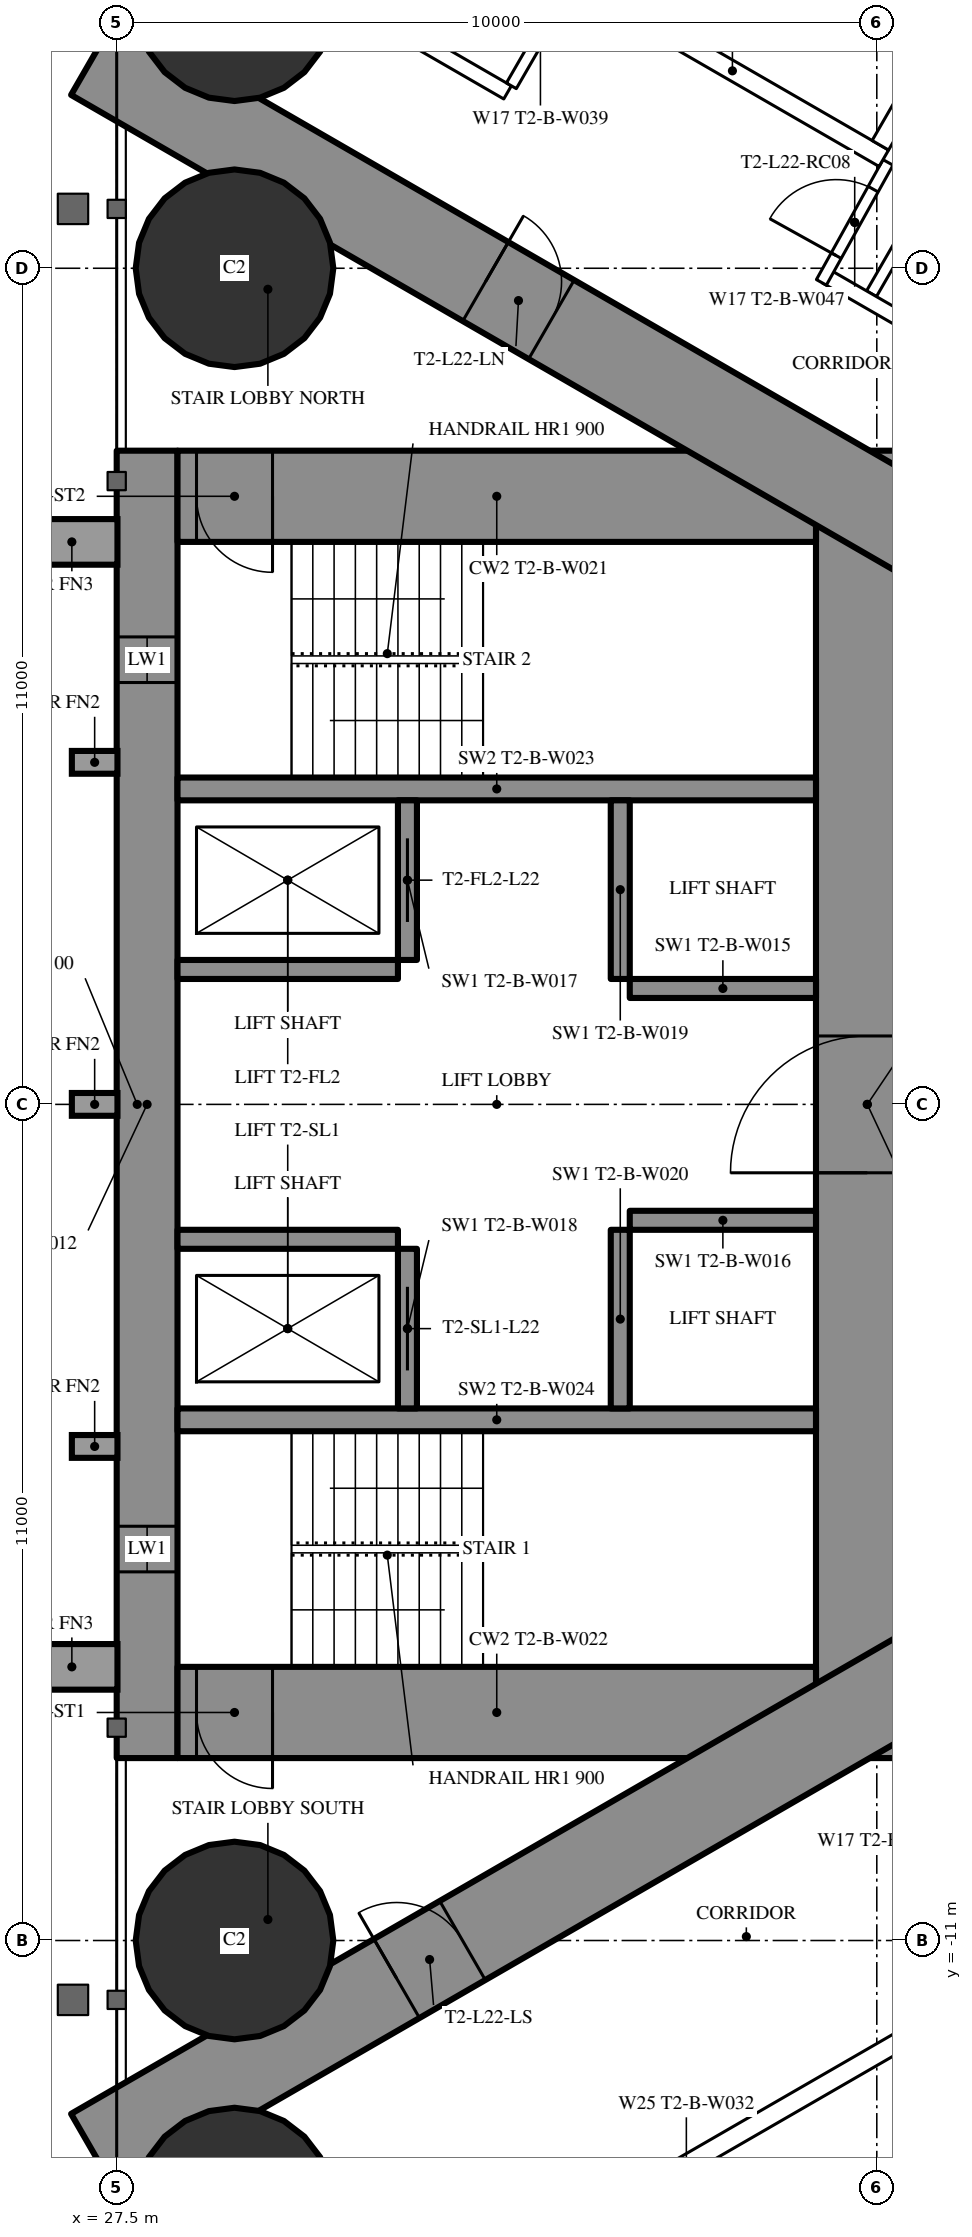
"""IFC4 building model, lengths in metres.
Left out: names, types, materials, properties, quantities, classifications, styles, units other than length and angle.
Written with IfcOpenShell. Run it as: python <this file> out.ifc"""

import sys

from ifc_helpers import new_model, si_unit, direction, frame, frame_2d, origin, origin_2d, place, context, subcontext, project, spatial, rectangle, hollow_circle, extrude, element, fill, save


model = new_model("IFC4")
c1 = context("Model", 3, precision=1e-05, world=origin(), true_north=direction((0.0, 1.0)))
c2 = subcontext(c1, "Body", "Model", "MODEL_VIEW")
j1 = project(units=[si_unit("LENGTHUNIT", "METRE"), si_unit("PLANEANGLEUNIT", "RADIAN")], contexts=[c1])
p1 = place(None, origin())
s1 = spatial("IfcSite", under=j1, at=p1, CompositionType="ELEMENT")
p2 = place(p1, origin())
s2 = spatial("IfcBuilding", under=s1, at=p2, CompositionType="ELEMENT")
p3 = place(p2, frame((0.0, 0.0, 87.0)))
s3 = spatial("IfcBuildingStorey", under=s2, at=p3, CompositionType="ELEMENT", Elevation=87.0)
for number, where, z_axis, x_axis in (
    (1, (29.05, 11.0, 0.0), (0.0, 0.0, 1.0), (1.0, 0.0, 0.0)),
    (2, (29.05, -11.0, 0.0), (0.0, 0.0, 1.0), (1.0, 0.0, 0.0)),
    (3, (29.05, -14.5, 0.0), (0.0, 0.0, 1.0), (1.0, 0.0, 0.0)),
    (4, (29.05, 14.5, 0.0), (0.0, 0.0, 1.0), (1.0, 0.0, 0.0)),
):
    element("IfcColumn", number, at=place(p3, frame(where, z_axis=z_axis, x_axis=x_axis)), inside=s3, PredefinedType="COLUMN", context=c2, shape_type="SweptSolid", body=[
        extrude(hollow_circle(Radius=1.3, WallThickness=0.1, at=origin_2d()), origin(), (0.0, 0.0, 1.0), 3.6),
    ])
p4 = place(p3, frame((27.9, -8.6, 0.0), z_axis=(0.0, 0.0, 1.0), x_axis=(0.0, 1.0, 0.0)))
e5 = element("IfcWall", 5, at=p4, inside=s3, PredefinedType="SHEAR", context=c2, shape_type="SweptSolid", body=[
    extrude(rectangle(XDim=17.2, YDim=0.8, at=frame_2d((8.6, 0.0))), origin(), (0.0, 0.0, 1.0), 3.6),
])
p5 = place(p4, frame((2.45, 0.0, 0.6)))
e6 = element("IfcOpeningElement", 6, at=p5, cuts=e5, PredefinedType="OPENING", context=c2, shape_type="SweptSolid", body=[
    extrude(rectangle(XDim=0.6, YDim=2.1, at=frame_2d((0.3, 1.05))), frame((0.0, 0.41, 0.0), z_axis=(0.0, -1.0, 0.0), x_axis=(1.0, 0.0, 0.0)), (0.0, 0.0, 1.0), 0.82),
])
p6 = place(p4, frame((14.15, 0.0, 0.6)))
e7 = element("IfcOpeningElement", 7, at=p6, cuts=e5, PredefinedType="OPENING", context=c2, shape_type="SweptSolid", body=[
    extrude(rectangle(XDim=0.6, YDim=2.1, at=frame_2d((0.3, 1.05))), frame((0.0, 0.41, 0.0), z_axis=(0.0, -1.0, 0.0), x_axis=(1.0, 0.0, 0.0)), (0.0, 0.0, 1.0), 0.82),
])
p7 = place(p3, frame((37.375, -8.6, 0.0), z_axis=(0.0, 0.0, 1.0), x_axis=(0.0, 1.0, 0.0)))
e8 = element("IfcWall", 8, at=p7, inside=s3, PredefinedType="SHEAR", context=c2, shape_type="SweptSolid", body=[
    extrude(rectangle(XDim=17.2, YDim=1.35, at=frame_2d((8.6, 0.0))), origin(), (0.0, 0.0, 1.0), 3.6),
])
p8 = place(p7, frame((7.7, 0.0, 0.0)))
e9 = element("IfcOpeningElement", 9, at=p8, cuts=e8, PredefinedType="OPENING", context=c2, shape_type="SweptSolid", body=[
    extrude(rectangle(XDim=1.8, YDim=2.2, at=frame_2d((0.9, 1.1))), frame((0.0, 0.685, 0.0), z_axis=(0.0, -1.0, 0.0), x_axis=(1.0, 0.0, 0.0)), (0.0, 0.0, 1.0), 1.37),
])
p9 = place(p3, frame((28.3, -8.0, 0.0), z_axis=(0.0, 0.0, 1.0), x_axis=(1.0, 0.0, 0.0)))
e10 = element("IfcWall", 10, at=p9, inside=s3, PredefinedType="SHEAR", context=c2, shape_type="SweptSolid", body=[
    extrude(rectangle(XDim=8.4, YDim=1.2, at=frame_2d((4.2, 0.0))), origin(), (0.0, 0.0, 1.0), 3.6),
])
p10 = place(p9, frame((0.25, 0.0, 0.0)))
e11 = element("IfcOpeningElement", 11, at=p10, cuts=e10, PredefinedType="OPENING", context=c2, shape_type="SweptSolid", body=[
    extrude(rectangle(XDim=1.0, YDim=2.2, at=frame_2d((0.5, 1.1))), frame((0.0, 0.61, 0.0), z_axis=(0.0, -1.0, 0.0), x_axis=(1.0, 0.0, 0.0)), (0.0, 0.0, 1.0), 1.22),
])
p11 = place(p3, frame((28.3, 8.0, 0.0), z_axis=(0.0, 0.0, 1.0), x_axis=(1.0, 0.0, 0.0)))
e12 = element("IfcWall", 12, at=p11, inside=s3, PredefinedType="SHEAR", context=c2, shape_type="SweptSolid", body=[
    extrude(rectangle(XDim=8.4, YDim=1.2, at=frame_2d((4.2, 0.0))), origin(), (0.0, 0.0, 1.0), 3.6),
])
p12 = place(p11, frame((0.25, 0.0, 0.0)))
e13 = element("IfcOpeningElement", 13, at=p12, cuts=e12, PredefinedType="OPENING", context=c2, shape_type="SweptSolid", body=[
    extrude(rectangle(XDim=1.0, YDim=2.2, at=frame_2d((0.5, 1.1))), frame((0.0, 0.61, 0.0), z_axis=(0.0, -1.0, 0.0), x_axis=(1.0, 0.0, 0.0)), (0.0, 0.0, 1.0), 1.22),
])
for number, where, z_axis, x_axis in (
    (14, (28.3, -4.15, 0.0), (0.0, 0.0, 1.0), (1.0, 0.0, 0.0)),
    (15, (28.3, 4.15, 0.0), (0.0, 0.0, 1.0), (1.0, 0.0, 0.0)),
):
    element("IfcWall", number, at=place(p3, frame(where, z_axis=z_axis, x_axis=x_axis)), inside=s3, PredefinedType="SHEAR", context=c2, shape_type="SweptSolid", body=[
        extrude(rectangle(XDim=8.4, YDim=0.3, at=frame_2d((4.2, 0.0))), origin(), (0.0, 0.0, 1.0), 3.6),
    ])
p13 = place(p3, frame((31.325, -4.0, 0.0), z_axis=(0.0, 0.0, 1.0), x_axis=(0.0, 1.0, 0.0)))
e16 = element("IfcWall", 16, at=p13, inside=s3, PredefinedType="SHEAR", context=c2, shape_type="SweptSolid", body=[
    extrude(rectangle(XDim=2.1, YDim=0.25, at=frame_2d((1.05, 0.0))), origin(), (0.0, 0.0, 1.0), 3.6),
])
p14 = place(p13, frame((0.5, 0.0, 0.0)))
e17 = element("IfcOpeningElement", 17, at=p14, cuts=e16, PredefinedType="OPENING", context=c2, shape_type="SweptSolid", body=[
    extrude(rectangle(XDim=1.1, YDim=2.2, at=frame_2d((0.55, 1.1))), frame((0.0, 0.135, 0.0), z_axis=(0.0, -1.0, 0.0), x_axis=(1.0, 0.0, 0.0)), (0.0, 0.0, 1.0), 0.27),
])
p15 = place(p3, frame((34.125, -4.0, 0.0), z_axis=(0.0, 0.0, 1.0), x_axis=(0.0, 1.0, 0.0)))
e18 = element("IfcWall", 18, at=p15, inside=s3, PredefinedType="SHEAR", context=c2, shape_type="SweptSolid", body=[
    extrude(rectangle(XDim=2.35, YDim=0.25, at=frame_2d((1.175, 0.0))), origin(), (0.0, 0.0, 1.0), 3.6),
])
p16 = place(p3, frame((28.3, -1.775, 0.0), z_axis=(0.0, 0.0, 1.0), x_axis=(1.0, 0.0, 0.0)))
e19 = element("IfcWall", 19, at=p16, inside=s3, PredefinedType="SHEAR", context=c2, shape_type="SweptSolid", body=[
    extrude(rectangle(XDim=2.9, YDim=0.25, at=frame_2d((1.45, 0.0))), origin(), (0.0, 0.0, 1.0), 3.6),
])
p17 = place(p3, frame((34.25, -1.525, 0.0), z_axis=(0.0, 0.0, 1.0), x_axis=(1.0, 0.0, 0.0)))
e20 = element("IfcWall", 20, at=p17, inside=s3, PredefinedType="SHEAR", context=c2, shape_type="SweptSolid", body=[
    extrude(rectangle(XDim=2.45, YDim=0.25, at=frame_2d((1.225, 0.0))), origin(), (0.0, 0.0, 1.0), 3.6),
])
p18 = place(p3, frame((31.325, 1.9, 0.0), z_axis=(0.0, 0.0, 1.0), x_axis=(0.0, 1.0, 0.0)))
e21 = element("IfcWall", 21, at=p18, inside=s3, PredefinedType="SHEAR", context=c2, shape_type="SweptSolid", body=[
    extrude(rectangle(XDim=2.1, YDim=0.25, at=frame_2d((1.05, 0.0))), origin(), (0.0, 0.0, 1.0), 3.6),
])
p19 = place(p18, frame((0.5, 0.0, 0.0)))
e22 = element("IfcOpeningElement", 22, at=p19, cuts=e21, PredefinedType="OPENING", context=c2, shape_type="SweptSolid", body=[
    extrude(rectangle(XDim=1.1, YDim=2.2, at=frame_2d((0.55, 1.1))), frame((0.0, 0.135, 0.0), z_axis=(0.0, -1.0, 0.0), x_axis=(1.0, 0.0, 0.0)), (0.0, 0.0, 1.0), 0.27),
])
p20 = place(p3, frame((34.125, 1.65, 0.0), z_axis=(0.0, 0.0, 1.0), x_axis=(0.0, 1.0, 0.0)))
e23 = element("IfcWall", 23, at=p20, inside=s3, PredefinedType="SHEAR", context=c2, shape_type="SweptSolid", body=[
    extrude(rectangle(XDim=2.35, YDim=0.25, at=frame_2d((1.175, 0.0))), origin(), (0.0, 0.0, 1.0), 3.6),
])
p21 = place(p3, frame((28.3, 1.775, 0.0), z_axis=(0.0, 0.0, 1.0), x_axis=(1.0, 0.0, 0.0)))
e24 = element("IfcWall", 24, at=p21, inside=s3, PredefinedType="SHEAR", context=c2, shape_type="SweptSolid", body=[
    extrude(rectangle(XDim=2.9, YDim=0.25, at=frame_2d((1.45, 0.0))), origin(), (0.0, 0.0, 1.0), 3.6),
])
p22 = place(p3, frame((34.25, 1.525, 0.0), z_axis=(0.0, 0.0, 1.0), x_axis=(1.0, 0.0, 0.0)))
e25 = element("IfcWall", 25, at=p22, inside=s3, PredefinedType="SHEAR", context=c2, shape_type="SweptSolid", body=[
    extrude(rectangle(XDim=2.45, YDim=0.25, at=frame_2d((1.225, 0.0))), origin(), (0.0, 0.0, 1.0), 3.6),
])
p23 = place(p3, frame((27.2, -13.8, 0.0), z_axis=(0.0, 0.0, 1.0), x_axis=(0.866027159892, 0.499996958321, 0.0)))
e26 = element("IfcWall", 26, at=p23, inside=s3, PredefinedType="SHEAR", context=c2, shape_type="SweptSolid", body=[
    extrude(rectangle(XDim=27.947, YDim=1.2, at=frame_2d((13.973, 0.0))), origin(), (0.0, 0.0, 1.0), 3.6),
])
p24 = place(p23, frame((4.6, 0.0, 0.0)))
e27 = element("IfcOpeningElement", 27, at=p24, cuts=e26, PredefinedType="OPENING", context=c2, shape_type="SweptSolid", body=[
    extrude(rectangle(XDim=1.0, YDim=2.2, at=frame_2d((0.5, 1.1))), frame((0.0, 0.61, 0.0), z_axis=(0.0, -1.0, 0.0), x_axis=(1.0, 0.0, 0.0)), (0.0, 0.0, 1.0), 1.22),
])
p25 = place(p23, frame((14.018, 0.0, 0.0)))
e28 = element("IfcOpeningElement", 28, at=p25, cuts=e26, PredefinedType="OPENING", context=c2, shape_type="SweptSolid", body=[
    extrude(rectangle(XDim=1.8, YDim=2.2, at=frame_2d((0.9, 1.1))), frame((0.0, 0.61, 0.0), z_axis=(0.0, -1.0, 0.0), x_axis=(1.0, 0.0, 0.0)), (0.0, 0.0, 1.0), 1.22),
])
p26 = place(p3, frame((27.2, 13.8, 0.0), z_axis=(0.0, 0.0, 1.0), x_axis=(0.866024515034, -0.500001539357, 0.0)))
e29 = element("IfcWall", 29, at=p26, inside=s3, PredefinedType="SHEAR", context=c2, shape_type="SweptSolid", body=[
    extrude(rectangle(XDim=26.907, YDim=1.2, at=frame_2d((13.454, 0.0))), origin(), (0.0, 0.0, 1.0), 3.6),
])
p27 = place(p26, frame((5.95, 0.0, 0.0)))
e30 = element("IfcOpeningElement", 30, at=p27, cuts=e29, PredefinedType="OPENING", context=c2, shape_type="SweptSolid", body=[
    extrude(rectangle(XDim=1.0, YDim=2.2, at=frame_2d((0.5, 1.1))), frame((0.0, 0.61, 0.0), z_axis=(0.0, -1.0, 0.0), x_axis=(1.0, 0.0, 0.0)), (0.0, 0.0, 1.0), 1.22),
])
p28 = place(p26, frame((13.568, 0.0, 0.0)))
e31 = element("IfcOpeningElement", 31, at=p28, cuts=e29, PredefinedType="OPENING", context=c2, shape_type="SweptSolid", body=[
    extrude(rectangle(XDim=1.8, YDim=2.03, at=frame_2d((0.9, 1.015))), frame((0.0, 0.61, 0.0), z_axis=(0.0, -1.0, 0.0), x_axis=(1.0, 0.0, 0.0)), (0.0, 0.0, 1.0), 1.22),
])
p29 = place(p3, frame((37.43, 10.665, 0.0), z_axis=(0.0, 0.0, 1.0), x_axis=(0.499989991081, 0.866031182359, 0.0)))
e32 = element("IfcWall", 32, at=p29, inside=s3, PredefinedType="PARTITIONING", context=c2, shape_type="SweptSolid", body=[
    extrude(rectangle(XDim=8.373, YDim=0.15, at=frame_2d((4.187, 0.0))), origin(), (0.0, 0.0, 1.0), 2.3),
])
p30 = place(p3, frame((27.5, 16.282, 0.0), z_axis=(0.0, 0.0, 1.0), x_axis=(0.866038377622, -0.499977527982, 0.0)))
e33 = element("IfcWall", 33, at=p30, inside=s3, PredefinedType="PARTITIONING", context=c2, shape_type="SweptSolid", body=[
    extrude(rectangle(XDim=5.938, YDim=0.2, at=frame_2d((2.969, 0.0))), origin(), (0.0, 0.0, 1.0), 3.35),
])
p31 = place(p3, frame((36.834, 10.894, 0.0), z_axis=(0.0, 0.0, 1.0), x_axis=(0.866028157229, -0.499995230863, 0.0)))
e34 = element("IfcWall", 34, at=p31, inside=s3, PredefinedType="PARTITIONING", context=c2, shape_type="SweptSolid", body=[
    extrude(rectangle(XDim=21.667, YDim=0.2, at=frame_2d((10.833, 0.0))), origin(), (0.0, 0.0, 1.0), 3.35),
])
p32 = place(p31, frame((16.236, 0.0, 0.0)))
e35 = element("IfcOpeningElement", 35, at=p32, cuts=e34, PredefinedType="OPENING", context=c2, shape_type="SweptSolid", body=[
    extrude(rectangle(XDim=1.8, YDim=2.2, at=frame_2d((0.9, 1.1))), frame((0.0, 0.11, 0.0), z_axis=(0.0, -1.0, 0.0), x_axis=(1.0, 0.0, 0.0)), (0.0, 0.0, 1.0), 0.22),
])
p33 = place(p31, frame((5.696, 0.0, 0.0)))
e36 = element("IfcOpeningElement", 36, at=p33, cuts=e34, PredefinedType="OPENING", context=c2, shape_type="SweptSolid", body=[
    extrude(rectangle(XDim=2.0, YDim=2.4, at=frame_2d((1.0, 1.2))), frame((0.0, 0.11, 0.0), z_axis=(0.0, -1.0, 0.0), x_axis=(1.0, 0.0, 0.0)), (0.0, 0.0, 1.0), 0.22),
])
p34 = place(p3, frame((36.771, 10.814, 0.0), z_axis=(0.0, 0.0, 1.0), x_axis=(0.485585508183, 0.874189175317, 0.0)))
e37 = element("IfcWall", 37, at=p34, inside=s3, PredefinedType="PARTITIONING", context=c2, shape_type="SweptSolid", body=[
    extrude(rectangle(XDim=1.805, YDim=0.15, at=frame_2d((0.902, 0.0))), origin(), (0.0, 0.0, 1.0), 3.35),
])
p35 = place(p34, frame((0.403, 0.0, 0.0)))
e38 = element("IfcOpeningElement", 38, at=p35, cuts=e37, PredefinedType="OPENING", context=c2, shape_type="SweptSolid", body=[
    extrude(rectangle(XDim=1.0, YDim=2.03, at=frame_2d((0.5, 1.015))), frame((0.0, 0.085, 0.0), z_axis=(0.0, -1.0, 0.0), x_axis=(1.0, 0.0, 0.0)), (0.0, 0.0, 1.0), 0.17),
])
p36 = place(p3, frame((32.692, 13.4, 0.0), z_axis=(0.0, 0.0, 1.0), x_axis=(0.499985008713, 0.866034058835, 0.0)))
e39 = element("IfcWall", 39, at=p36, inside=s3, PredefinedType="PARTITIONING", context=c2, shape_type="SweptSolid", body=[
    extrude(rectangle(XDim=1.529, YDim=0.15, at=frame_2d((0.765, 0.0))), origin(), (0.0, 0.0, 1.0), 3.35),
])
p37 = place(p3, frame((31.271, -16.097, 0.0), z_axis=(0.0, 0.0, 1.0), x_axis=(0.86604045752, 0.499973925258, 0.0)))
e40 = element("IfcWall", 40, at=p37, inside=s3, PredefinedType="PARTITIONING", context=c2, shape_type="SweptSolid", body=[
    extrude(rectangle(XDim=8.6, YDim=0.25, at=frame_2d((4.3, 0.0))), origin(), (0.0, 0.0, 1.0), 3.35),
])
p38 = place(p3, frame((33.608, 14.747, 0.0), z_axis=(0.0, 0.0, 1.0), x_axis=(0.866043305498, -0.49996899204, 0.0)))
e41 = element("IfcWall", 41, at=p38, inside=s3, PredefinedType="PARTITIONING", context=c2, shape_type="SweptSolid", body=[
    extrude(rectangle(XDim=4.6, YDim=0.25, at=frame_2d((2.3, 0.0))), origin(), (0.0, 0.0, 1.0), 3.35),
])
p39 = place(p3, frame((37.547, 12.618, 0.0), z_axis=(0.0, 0.0, 1.0), x_axis=(0.499929347863, 0.866066190972, 0.0)))
e42 = element("IfcWall", 42, at=p39, inside=s3, PredefinedType="PARTITIONING", context=c2, shape_type="SweptSolid", body=[
    extrude(rectangle(XDim=3.201, YDim=0.25, at=frame_2d((1.6, 0.0))), origin(), (0.0, 0.0, 1.0), 3.35),
])
p40 = place(p35, origin())
e43 = element("IfcDoor", 43, at=p40, inside=s3, OperationType="SINGLE_SWING_LEFT", PredefinedType="DOOR", context=c2, shape_type="SweptSolid", body=[
    extrude(rectangle(XDim=1.0, YDim=2.03, at=frame_2d((0.5, 1.015))), frame((0.0, 0.025, 0.0), z_axis=(0.0, -1.0, 0.0), x_axis=(1.0, 0.0, 0.0)), (0.0, 0.0, 1.0), 0.05),
])
fill(e38, e43)
p41 = place(p24, origin())
e44 = element("IfcDoor", 44, at=p41, inside=s3, OperationType="SINGLE_SWING_LEFT", PredefinedType="DOOR", context=c2, shape_type="SweptSolid", body=[
    extrude(rectangle(XDim=1.0, YDim=2.2, at=frame_2d((0.5, 1.1))), frame((0.0, 0.025, 0.0), z_axis=(0.0, -1.0, 0.0), x_axis=(1.0, 0.0, 0.0)), (0.0, 0.0, 1.0), 0.05),
])
fill(e27, e44)
p42 = place(p27, origin())
e45 = element("IfcDoor", 45, at=p42, inside=s3, OperationType="SINGLE_SWING_LEFT", PredefinedType="DOOR", context=c2, shape_type="SweptSolid", body=[
    extrude(rectangle(XDim=1.0, YDim=2.2, at=frame_2d((0.5, 1.1))), frame((0.0, 0.025, 0.0), z_axis=(0.0, -1.0, 0.0), x_axis=(1.0, 0.0, 0.0)), (0.0, 0.0, 1.0), 0.05),
])
fill(e30, e45)
p43 = place(p8, origin())
e46 = element("IfcDoor", 46, at=p43, inside=s3, OperationType="DOUBLE_DOOR_SINGLE_SWING", PredefinedType="DOOR", context=c2, shape_type="SweptSolid", body=[
    extrude(rectangle(XDim=1.8, YDim=2.2, at=frame_2d((0.9, 1.1))), frame((0.0, 0.025, 0.0), z_axis=(0.0, -1.0, 0.0), x_axis=(1.0, 0.0, 0.0)), (0.0, 0.0, 1.0), 0.05),
])
fill(e9, e46)
p44 = place(p10, origin())
e47 = element("IfcDoor", 47, at=p44, inside=s3, OperationType="SINGLE_SWING_RIGHT", PredefinedType="DOOR", context=c2, shape_type="SweptSolid", body=[
    extrude(rectangle(XDim=1.0, YDim=2.2, at=frame_2d((0.5, 1.1))), frame((0.0, 0.025, 0.0), z_axis=(0.0, -1.0, 0.0), x_axis=(1.0, 0.0, 0.0)), (0.0, 0.0, 1.0), 0.05),
])
fill(e11, e47)
p45 = place(p12, origin())
e48 = element("IfcDoor", 48, at=p45, inside=s3, OperationType="SINGLE_SWING_RIGHT", PredefinedType="DOOR", context=c2, shape_type="SweptSolid", body=[
    extrude(rectangle(XDim=1.0, YDim=2.2, at=frame_2d((0.5, 1.1))), frame((0.0, 0.025, 0.0), z_axis=(0.0, -1.0, 0.0), x_axis=(1.0, 0.0, 0.0)), (0.0, 0.0, 1.0), 0.05),
])
fill(e13, e48)
p46 = place(p14, origin())
e49 = element("IfcDoor", 49, at=p46, inside=s3, OperationType="SLIDING_TO_LEFT", PredefinedType="USERDEFINED", context=c2, shape_type="SweptSolid", body=[
    extrude(rectangle(XDim=1.1, YDim=2.2, at=frame_2d((0.55, 1.1))), frame((0.0, 0.025, 0.0), z_axis=(0.0, -1.0, 0.0), x_axis=(1.0, 0.0, 0.0)), (0.0, 0.0, 1.0), 0.05),
])
fill(e17, e49)
p47 = place(p19, origin())
e50 = element("IfcDoor", 50, at=p47, inside=s3, OperationType="SLIDING_TO_LEFT", PredefinedType="USERDEFINED", context=c2, shape_type="SweptSolid", body=[
    extrude(rectangle(XDim=1.1, YDim=2.2, at=frame_2d((0.55, 1.1))), frame((0.0, 0.025, 0.0), z_axis=(0.0, -1.0, 0.0), x_axis=(1.0, 0.0, 0.0)), (0.0, 0.0, 1.0), 0.05),
])
fill(e22, e50)
p48 = place(p5, origin())
e51 = element("IfcWindow", 51, at=p48, inside=s3, PartitioningType="SINGLE_PANEL", PredefinedType="WINDOW", context=c2, shape_type="SweptSolid", body=[
    extrude(rectangle(XDim=0.6, YDim=2.1, at=frame_2d((0.3, 1.05))), frame((0.0, 0.03, 0.0), z_axis=(0.0, -1.0, 0.0), x_axis=(1.0, 0.0, 0.0)), (0.0, 0.0, 1.0), 0.06),
])
fill(e6, e51)
p49 = place(p6, origin())
e52 = element("IfcWindow", 52, at=p49, inside=s3, PartitioningType="SINGLE_PANEL", PredefinedType="WINDOW", context=c2, shape_type="SweptSolid", body=[
    extrude(rectangle(XDim=0.6, YDim=2.1, at=frame_2d((0.3, 1.05))), frame((0.0, 0.03, 0.0), z_axis=(0.0, -1.0, 0.0), x_axis=(1.0, 0.0, 0.0)), (0.0, 0.0, 1.0), 0.06),
])
fill(e7, e52)
save(model, sys.argv[1])
